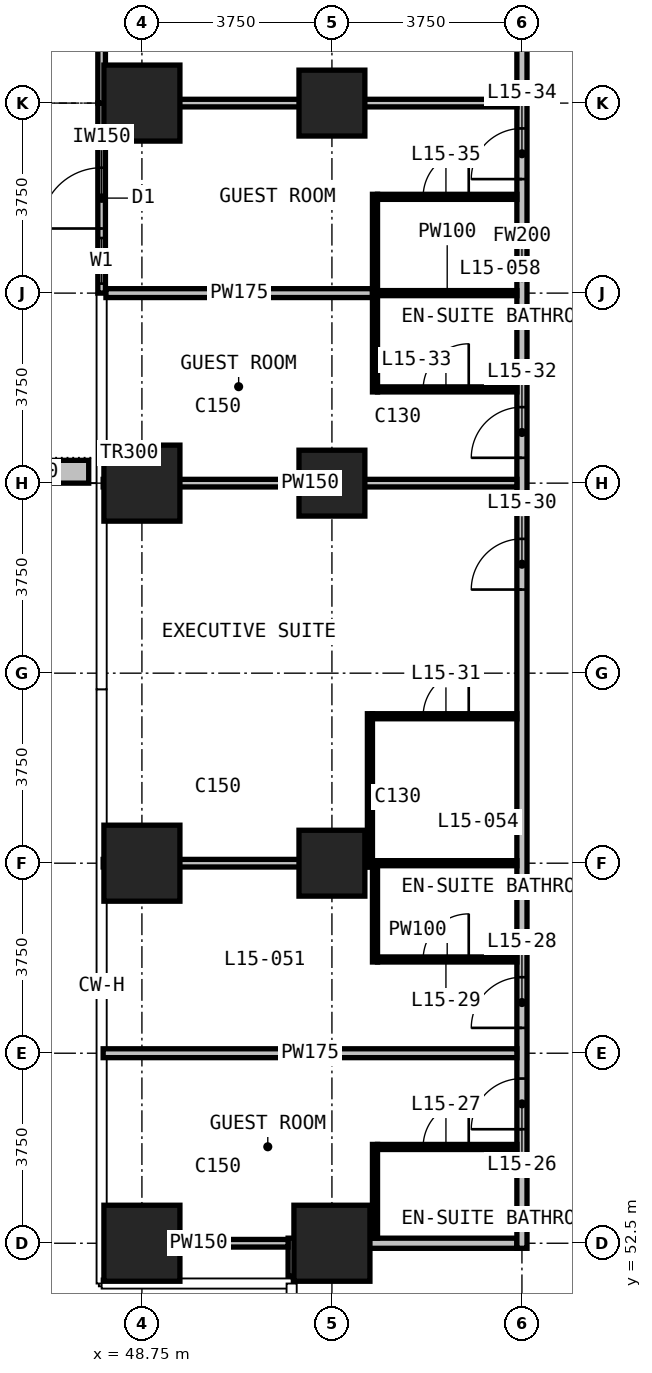
"""IFC4 building model, lengths in metres.
Left out: names, types, materials, properties, quantities, classifications, styles, units other than length and angle.
Written with IfcOpenShell. Run it as: python <this file> out.ifc"""

import sys

from ifc_helpers import new_model, si_unit, direction, frame, frame_2d, origin, origin_2d, place, context, subcontext, project, spatial, rectangle, extrude, element, fill, save


model = new_model("IFC4")
c1 = context("Model", 3, precision=1e-05, world=origin(), true_north=direction((0.0, 1.0)))
c2 = subcontext(c1, "Body", "Model", "MODEL_VIEW")
j1 = project(units=[si_unit("LENGTHUNIT", "METRE"), si_unit("PLANEANGLEUNIT", "RADIAN")], contexts=[c1])
p1 = place(None, origin())
s1 = spatial("IfcSite", under=j1, at=p1, CompositionType="ELEMENT")
p2 = place(p1, origin())
s2 = spatial("IfcBuilding", under=s1, at=p2, CompositionType="ELEMENT")
p3 = place(p2, frame((0.0, 0.0, 69.2)))
s3 = spatial("IfcBuildingStorey", under=s2, at=p3, CompositionType="ELEMENT", Elevation=69.2)
for number, where, z_axis, x_axis in (
    (1, (48.75, 52.5, 0.0), (0.0, 0.0, 1.0), (1.0, 0.0, 0.0)),
    (2, (48.75, 60.0, 0.0), (0.0, 0.0, 1.0), (1.0, 0.0, 0.0)),
    (3, (48.75, 67.5, 0.0), (0.0, 0.0, 1.0), (1.0, 0.0, 0.0)),
    (4, (48.75, 75.0, 0.0), (0.0, 0.0, 1.0), (1.0, 0.0, 0.0)),
    (5, (52.5, 52.5, 0.0), (0.0, 0.0, 1.0), (1.0, 0.0, 0.0)),
):
    element("IfcColumn", number, at=place(p3, frame(where, z_axis=z_axis, x_axis=x_axis)), inside=s3, PredefinedType="COLUMN", context=c2, shape_type="SweptSolid", body=[
        extrude(rectangle(XDim=1.5, YDim=1.5, at=origin_2d()), origin(), (0.0, 0.0, 1.0), 3.3),
    ])
for number, where, z_axis, x_axis in (
    (6, (52.5, 60.0, 0.0), (0.0, 0.0, 1.0), (1.0, 0.0, 0.0)),
    (7, (52.5, 67.5, 0.0), (0.0, 0.0, 1.0), (1.0, 0.0, 0.0)),
    (8, (52.5, 75.0, 0.0), (0.0, 0.0, 1.0), (1.0, 0.0, 0.0)),
):
    element("IfcColumn", number, at=place(p3, frame(where, z_axis=z_axis, x_axis=x_axis)), inside=s3, PredefinedType="COLUMN", context=c2, shape_type="SweptSolid", body=[
        extrude(rectangle(XDim=1.3, YDim=1.3, at=origin_2d()), origin(), (0.0, 0.0, 1.0), 3.3),
    ])
p4 = place(p3, frame((47.955, 71.25, 0.0), z_axis=(0.0, 0.0, 1.0), x_axis=(0.0, 1.0, 0.0)))
e9 = element("IfcWall", 9, at=p4, inside=s3, PredefinedType="SOLIDWALL", context=c2, shape_type="SweptSolid", body=[
    extrude(rectangle(XDim=3.75, YDim=0.15, at=frame_2d((1.875, 0.0))), origin(), (0.0, 0.0, 1.0), 3.0),
])
p5 = place(p4, frame((0.188, 0.0, 0.1)))
e10 = element("IfcOpeningElement", 10, at=p5, cuts=e9, PredefinedType="OPENING", context=c2, shape_type="SweptSolid", body=[
    extrude(rectangle(XDim=0.9, YDim=2.4, at=frame_2d((0.45, 1.2))), frame((0.0, 0.085, 0.0), z_axis=(0.0, -1.0, 0.0), x_axis=(1.0, 0.0, 0.0)), (0.0, 0.0, 1.0), 0.17),
])
p6 = place(p4, frame((1.275, 0.0, 0.0)))
e11 = element("IfcOpeningElement", 11, at=p6, cuts=e9, PredefinedType="OPENING", context=c2, shape_type="SweptSolid", body=[
    extrude(rectangle(XDim=1.2, YDim=2.4, at=frame_2d((0.6, 1.2))), frame((0.0, 0.085, 0.0), z_axis=(0.0, -1.0, 0.0), x_axis=(1.0, 0.0, 0.0)), (0.0, 0.0, 1.0), 0.17),
])
p7 = place(p3, frame((47.955, 75.0, 0.0), z_axis=(0.0, 0.0, 1.0), x_axis=(0.0, 1.0, 0.0)))
e12 = element("IfcWall", 12, at=p7, inside=s3, PredefinedType="SOLIDWALL", context=c2, shape_type="SweptSolid", body=[
    extrude(rectangle(XDim=3.75, YDim=0.15, at=frame_2d((1.875, 0.0))), origin(), (0.0, 0.0, 1.0), 3.0),
])
p8 = place(p7, frame((1.275, 0.0, 0.0)))
e13 = element("IfcOpeningElement", 13, at=p8, cuts=e12, PredefinedType="OPENING", context=c2, shape_type="SweptSolid", body=[
    extrude(rectangle(XDim=1.2, YDim=2.4, at=frame_2d((0.6, 1.2))), frame((0.0, 0.085, 0.0), z_axis=(0.0, -1.0, 0.0), x_axis=(1.0, 0.0, 0.0)), (0.0, 0.0, 1.0), 0.17),
])
p9 = place(p7, frame((2.663, 0.0, 0.1)))
e14 = element("IfcOpeningElement", 14, at=p9, cuts=e12, PredefinedType="OPENING", context=c2, shape_type="SweptSolid", body=[
    extrude(rectangle(XDim=0.9, YDim=2.4, at=frame_2d((0.45, 1.2))), frame((0.0, 0.085, 0.0), z_axis=(0.0, -1.0, 0.0), x_axis=(1.0, 0.0, 0.0)), (0.0, 0.0, 1.0), 0.17),
])
p10 = place(p3, frame((47.7, 67.725, 0.0), z_axis=(0.0, 0.0, 1.0), x_axis=(-1.0, 0.0, 0.0)))
e15 = element("IfcWall", 15, at=p10, inside=s3, PredefinedType="USERDEFINED", context=c2, shape_type="SweptSolid", body=[
    extrude(rectangle(XDim=2.35, YDim=0.45, at=frame_2d((1.175, 0.0))), origin(), (0.0, 0.0, 1.0), 1.1),
])
p11 = place(p3, frame((51.835, 52.5, 0.0), z_axis=(0.0, 0.0, 1.0), x_axis=(1.0, 0.0, 0.0)))
e16 = element("IfcWall", 16, at=p11, inside=s3, PredefinedType="PARTITIONING", context=c2, shape_type="SweptSolid", body=[
    extrude(rectangle(XDim=4.315, YDim=0.2, at=frame_2d((2.157, 0.0))), origin(), (0.0, 0.0, 1.0), 3.0),
])
p12 = place(p3, frame((51.735, 51.855, 0.0), z_axis=(0.0, 0.0, 1.0), x_axis=(0.0, 1.0, 0.0)))
e17 = element("IfcWall", 17, at=p12, inside=s3, PredefinedType="PARTITIONING", context=c2, shape_type="SweptSolid", body=[
    extrude(rectangle(XDim=0.745, YDim=0.2, at=frame_2d((0.373, 0.0))), origin(), (0.0, 0.0, 1.0), 3.0),
])
p13 = place(p3, frame((56.25, 52.4, 0.0), z_axis=(0.0, 0.0, 1.0), x_axis=(0.0, 1.0, 0.0)))
e18 = element("IfcWall", 18, at=p13, inside=s3, PredefinedType="PARTITIONING", context=c2, shape_type="SweptSolid", body=[
    extrude(rectangle(XDim=38.31, YDim=0.2, at=frame_2d((19.155, 0.0))), origin(), (0.0, 0.0, 1.0), 3.0),
])
p14 = place(p13, frame((2.35, 0.0, 0.0)))
e19 = element("IfcOpeningElement", 19, at=p14, cuts=e18, PredefinedType="OPENING", context=c2, shape_type="SweptSolid", body=[
    extrude(rectangle(XDim=1.0, YDim=2.2, at=frame_2d((0.5, 1.1))), frame((0.0, 0.11, 0.0), z_axis=(0.0, -1.0, 0.0), x_axis=(1.0, 0.0, 0.0)), (0.0, 0.0, 1.0), 0.22),
])
p15 = place(p13, frame((4.35, 0.0, 0.0)))
e20 = element("IfcOpeningElement", 20, at=p15, cuts=e18, PredefinedType="OPENING", context=c2, shape_type="SweptSolid", body=[
    extrude(rectangle(XDim=1.0, YDim=2.2, at=frame_2d((0.5, 1.1))), frame((0.0, 0.11, 0.0), z_axis=(0.0, -1.0, 0.0), x_axis=(1.0, 0.0, 0.0)), (0.0, 0.0, 1.0), 0.22),
])
p16 = place(p13, frame((13.0, 0.0, 0.0)))
e21 = element("IfcOpeningElement", 21, at=p16, cuts=e18, PredefinedType="OPENING", context=c2, shape_type="SweptSolid", body=[
    extrude(rectangle(XDim=1.0, YDim=2.2, at=frame_2d((0.5, 1.1))), frame((0.0, 0.11, 0.0), z_axis=(0.0, -1.0, 0.0), x_axis=(1.0, 0.0, 0.0)), (0.0, 0.0, 1.0), 0.22),
])
p17 = place(p13, frame((15.6, 0.0, 0.0)))
e22 = element("IfcOpeningElement", 22, at=p17, cuts=e18, PredefinedType="OPENING", context=c2, shape_type="SweptSolid", body=[
    extrude(rectangle(XDim=1.0, YDim=2.2, at=frame_2d((0.5, 1.1))), frame((0.0, 0.11, 0.0), z_axis=(0.0, -1.0, 0.0), x_axis=(1.0, 0.0, 0.0)), (0.0, 0.0, 1.0), 0.22),
])
p18 = place(p13, frame((21.1, 0.0, 0.0)))
e23 = element("IfcOpeningElement", 23, at=p18, cuts=e18, PredefinedType="OPENING", context=c2, shape_type="SweptSolid", body=[
    extrude(rectangle(XDim=1.0, YDim=2.2, at=frame_2d((0.5, 1.1))), frame((0.0, 0.11, 0.0), z_axis=(0.0, -1.0, 0.0), x_axis=(1.0, 0.0, 0.0)), (0.0, 0.0, 1.0), 0.22),
])
p19 = place(p13, frame((23.7, 0.0, 0.0)))
e24 = element("IfcOpeningElement", 24, at=p19, cuts=e18, PredefinedType="OPENING", context=c2, shape_type="SweptSolid", body=[
    extrude(rectangle(XDim=1.0, YDim=2.2, at=frame_2d((0.5, 1.1))), frame((0.0, 0.11, 0.0), z_axis=(0.0, -1.0, 0.0), x_axis=(1.0, 0.0, 0.0)), (0.0, 0.0, 1.0), 0.22),
])
p20 = place(p13, frame((31.55, 0.0, 0.0)))
e25 = element("IfcOpeningElement", 25, at=p20, cuts=e18, PredefinedType="OPENING", context=c2, shape_type="SweptSolid", body=[
    extrude(rectangle(XDim=0.9, YDim=2.2, at=frame_2d((0.45, 1.1))), frame((0.0, 0.11, 0.0), z_axis=(0.0, -1.0, 0.0), x_axis=(1.0, 0.0, 0.0)), (0.0, 0.0, 1.0), 0.22),
])
p21 = place(p13, frame((35.65, 0.0, 0.0)))
e26 = element("IfcOpeningElement", 26, at=p21, cuts=e18, PredefinedType="OPENING", context=c2, shape_type="SweptSolid", body=[
    extrude(rectangle(XDim=0.9, YDim=2.2, at=frame_2d((0.45, 1.1))), frame((0.0, 0.11, 0.0), z_axis=(0.0, -1.0, 0.0), x_axis=(1.0, 0.0, 0.0)), (0.0, 0.0, 1.0), 0.22),
])
p22 = place(p3, frame((47.985, 56.25, 0.0), z_axis=(0.0, 0.0, 1.0), x_axis=(1.0, 0.0, 0.0)))
e27 = element("IfcWall", 27, at=p22, inside=s3, PredefinedType="PARTITIONING", context=c2, shape_type="SweptSolid", body=[
    extrude(rectangle(XDim=8.165, YDim=0.175, at=frame_2d((4.083, 0.0))), origin(), (0.0, 0.0, 1.0), 3.0),
])
p23 = place(p3, frame((48.04, 71.25, 0.0), z_axis=(0.0, 0.0, 1.0), x_axis=(1.0, 0.0, 0.0)))
e28 = element("IfcWall", 28, at=p23, inside=s3, PredefinedType="PARTITIONING", context=c2, shape_type="SweptSolid", body=[
    extrude(rectangle(XDim=5.26, YDim=0.175, at=frame_2d((2.63, 0.0))), origin(), (0.0, 0.0, 1.0), 3.0),
])
p24 = place(p3, frame((48.105, 52.5, 0.0), z_axis=(0.0, 0.0, 1.0), x_axis=(1.0, 0.0, 0.0)))
e29 = element("IfcWall", 29, at=p24, inside=s3, PredefinedType="PARTITIONING", context=c2, shape_type="SweptSolid", body=[
    extrude(rectangle(XDim=3.53, YDim=0.15, at=frame_2d((1.765, 0.0))), origin(), (0.0, 0.0, 1.0), 3.0),
])
p25 = place(p3, frame((47.985, 60.0, 0.0), z_axis=(0.0, 0.0, 1.0), x_axis=(1.0, 0.0, 0.0)))
e30 = element("IfcWall", 30, at=p25, inside=s3, PredefinedType="PARTITIONING", context=c2, shape_type="SweptSolid", body=[
    extrude(rectangle(XDim=5.215, YDim=0.15, at=frame_2d((2.607, 0.0))), origin(), (0.0, 0.0, 1.0), 3.0),
])
p26 = place(p3, frame((47.985, 67.5, 0.0), z_axis=(0.0, 0.0, 1.0), x_axis=(1.0, 0.0, 0.0)))
e31 = element("IfcWall", 31, at=p26, inside=s3, PredefinedType="PARTITIONING", context=c2, shape_type="SweptSolid", body=[
    extrude(rectangle(XDim=8.165, YDim=0.15, at=frame_2d((4.083, 0.0))), origin(), (0.0, 0.0, 1.0), 3.0),
])
p27 = place(p3, frame((48.04, 75.0, 0.0), z_axis=(0.0, 0.0, 1.0), x_axis=(1.0, 0.0, 0.0)))
e32 = element("IfcWall", 32, at=p27, inside=s3, PredefinedType="PARTITIONING", context=c2, shape_type="SweptSolid", body=[
    extrude(rectangle(XDim=8.11, YDim=0.15, at=frame_2d((4.055, 0.0))), origin(), (0.0, 0.0, 1.0), 3.0),
])
p28 = place(p3, frame((53.4, 54.4, 0.0), z_axis=(0.0, 0.0, 1.0), x_axis=(1.0, 0.0, 0.0)))
e33 = element("IfcWall", 33, at=p28, inside=s3, PredefinedType="PARTITIONING", context=c2, shape_type="SweptSolid", body=[
    extrude(rectangle(XDim=2.75, YDim=0.1, at=frame_2d((1.375, 0.0))), origin(), (0.0, 0.0, 1.0), 3.0),
])
p29 = place(p28, frame((0.9, 0.0, 0.0)))
e34 = element("IfcOpeningElement", 34, at=p29, cuts=e33, PredefinedType="OPENING", context=c2, shape_type="SweptSolid", body=[
    extrude(rectangle(XDim=0.9, YDim=2.2, at=frame_2d((0.45, 1.1))), frame((0.0, 0.06, 0.0), z_axis=(0.0, -1.0, 0.0), x_axis=(1.0, 0.0, 0.0)), (0.0, 0.0, 1.0), 0.12),
])
p30 = place(p3, frame((53.4, 58.1, 0.0), z_axis=(0.0, 0.0, 1.0), x_axis=(1.0, 0.0, 0.0)))
e35 = element("IfcWall", 35, at=p30, inside=s3, PredefinedType="PARTITIONING", context=c2, shape_type="SweptSolid", body=[
    extrude(rectangle(XDim=2.75, YDim=0.1, at=frame_2d((1.375, 0.0))), origin(), (0.0, 0.0, 1.0), 3.0),
])
p31 = place(p30, frame((0.9, 0.0, 0.0)))
e36 = element("IfcOpeningElement", 36, at=p31, cuts=e35, PredefinedType="OPENING", context=c2, shape_type="SweptSolid", body=[
    extrude(rectangle(XDim=0.9, YDim=2.2, at=frame_2d((0.45, 1.1))), frame((0.0, 0.06, 0.0), z_axis=(0.0, -1.0, 0.0), x_axis=(1.0, 0.0, 0.0)), (0.0, 0.0, 1.0), 0.12),
])
p32 = place(p3, frame((53.4, 60.0, 0.0), z_axis=(0.0, 0.0, 1.0), x_axis=(1.0, 0.0, 0.0)))
e37 = element("IfcWall", 37, at=p32, inside=s3, PredefinedType="PARTITIONING", context=c2, shape_type="SweptSolid", body=[
    extrude(rectangle(XDim=2.75, YDim=0.1, at=frame_2d((1.375, 0.0))), origin(), (0.0, 0.0, 1.0), 3.0),
])
p33 = place(p3, frame((53.3, 62.9, 0.0), z_axis=(0.0, 0.0, 1.0), x_axis=(1.0, 0.0, 0.0)))
e38 = element("IfcWall", 38, at=p33, inside=s3, PredefinedType="PARTITIONING", context=c2, shape_type="SweptSolid", body=[
    extrude(rectangle(XDim=2.85, YDim=0.1, at=frame_2d((1.425, 0.0))), origin(), (0.0, 0.0, 1.0), 3.0),
])
p34 = place(p33, frame((1.0, 0.0, 0.0)))
e39 = element("IfcOpeningElement", 39, at=p34, cuts=e38, PredefinedType="OPENING", context=c2, shape_type="SweptSolid", body=[
    extrude(rectangle(XDim=0.9, YDim=2.2, at=frame_2d((0.45, 1.1))), frame((0.0, 0.06, 0.0), z_axis=(0.0, -1.0, 0.0), x_axis=(1.0, 0.0, 0.0)), (0.0, 0.0, 1.0), 0.12),
])
p35 = place(p3, frame((53.4, 69.35, 0.0), z_axis=(0.0, 0.0, 1.0), x_axis=(1.0, 0.0, 0.0)))
e40 = element("IfcWall", 40, at=p35, inside=s3, PredefinedType="PARTITIONING", context=c2, shape_type="SweptSolid", body=[
    extrude(rectangle(XDim=2.75, YDim=0.1, at=frame_2d((1.375, 0.0))), origin(), (0.0, 0.0, 1.0), 3.0),
])
p36 = place(p35, frame((0.9, 0.0, 0.0)))
e41 = element("IfcOpeningElement", 41, at=p36, cuts=e40, PredefinedType="OPENING", context=c2, shape_type="SweptSolid", body=[
    extrude(rectangle(XDim=0.9, YDim=2.2, at=frame_2d((0.45, 1.1))), frame((0.0, 0.06, 0.0), z_axis=(0.0, -1.0, 0.0), x_axis=(1.0, 0.0, 0.0)), (0.0, 0.0, 1.0), 0.12),
])
p37 = place(p3, frame((53.4, 71.25, 0.0), z_axis=(0.0, 0.0, 1.0), x_axis=(1.0, 0.0, 0.0)))
e42 = element("IfcWall", 42, at=p37, inside=s3, PredefinedType="PARTITIONING", context=c2, shape_type="SweptSolid", body=[
    extrude(rectangle(XDim=2.75, YDim=0.1, at=frame_2d((1.375, 0.0))), origin(), (0.0, 0.0, 1.0), 3.0),
])
p38 = place(p3, frame((53.4, 73.15, 0.0), z_axis=(0.0, 0.0, 1.0), x_axis=(1.0, 0.0, 0.0)))
e43 = element("IfcWall", 43, at=p38, inside=s3, PredefinedType="PARTITIONING", context=c2, shape_type="SweptSolid", body=[
    extrude(rectangle(XDim=2.75, YDim=0.1, at=frame_2d((1.375, 0.0))), origin(), (0.0, 0.0, 1.0), 3.0),
])
p39 = place(p38, frame((0.9, 0.0, 0.0)))
e44 = element("IfcOpeningElement", 44, at=p39, cuts=e43, PredefinedType="OPENING", context=c2, shape_type="SweptSolid", body=[
    extrude(rectangle(XDim=0.9, YDim=2.2, at=frame_2d((0.45, 1.1))), frame((0.0, 0.06, 0.0), z_axis=(0.0, -1.0, 0.0), x_axis=(1.0, 0.0, 0.0)), (0.0, 0.0, 1.0), 0.12),
])
p40 = place(p3, frame((53.25, 59.925, 0.0), z_axis=(0.0, 0.0, 1.0), x_axis=(0.0, 1.0, 0.0)))
e45 = element("IfcWall", 45, at=p40, inside=s3, PredefinedType="PARTITIONING", context=c2, shape_type="SweptSolid", body=[
    extrude(rectangle(XDim=3.025, YDim=0.1, at=frame_2d((1.512, 0.0))), origin(), (0.0, 0.0, 1.0), 3.0),
])
p41 = place(p3, frame((53.35, 52.6, 0.0), z_axis=(0.0, 0.0, 1.0), x_axis=(0.0, 1.0, 0.0)))
e46 = element("IfcWall", 46, at=p41, inside=s3, PredefinedType="PARTITIONING", context=c2, shape_type="SweptSolid", body=[
    extrude(rectangle(XDim=1.85, YDim=0.1, at=frame_2d((0.925, 0.0))), origin(), (0.0, 0.0, 1.0), 3.0),
])
p42 = place(p3, frame((53.35, 58.05, 0.0), z_axis=(0.0, 0.0, 1.0), x_axis=(0.0, 1.0, 0.0)))
e47 = element("IfcWall", 47, at=p42, inside=s3, PredefinedType="PARTITIONING", context=c2, shape_type="SweptSolid", body=[
    extrude(rectangle(XDim=2.0, YDim=0.1, at=frame_2d((1.0, 0.0))), origin(), (0.0, 0.0, 1.0), 3.0),
])
p43 = place(p3, frame((53.35, 69.3, 0.0), z_axis=(0.0, 0.0, 1.0), x_axis=(0.0, 1.0, 0.0)))
e48 = element("IfcWall", 48, at=p43, inside=s3, PredefinedType="PARTITIONING", context=c2, shape_type="SweptSolid", body=[
    extrude(rectangle(XDim=3.9, YDim=0.1, at=frame_2d((1.95, 0.0))), origin(), (0.0, 0.0, 1.0), 3.0),
])
p44 = place(p5, origin())
e49 = element("IfcWindow", 49, at=p44, inside=s3, PartitioningType="SINGLE_PANEL", PredefinedType="WINDOW", context=c2, shape_type="SweptSolid", body=[
    extrude(rectangle(XDim=0.9, YDim=2.4, at=frame_2d((0.45, 1.2))), frame((0.0, 0.03, 0.0), z_axis=(0.0, -1.0, 0.0), x_axis=(1.0, 0.0, 0.0)), (0.0, 0.0, 1.0), 0.06),
])
fill(e10, e49)
p45 = place(p6, origin())
e50 = element("IfcDoor", 50, at=p45, inside=s3, OperationType="SINGLE_SWING_LEFT", PredefinedType="DOOR", context=c2, shape_type="SweptSolid", body=[
    extrude(rectangle(XDim=1.2, YDim=2.4, at=frame_2d((0.6, 1.2))), frame((0.0, 0.025, 0.0), z_axis=(0.0, -1.0, 0.0), x_axis=(1.0, 0.0, 0.0)), (0.0, 0.0, 1.0), 0.05),
])
fill(e11, e50)
p46 = place(p14, origin())
e51 = element("IfcDoor", 51, at=p46, inside=s3, OperationType="SINGLE_SWING_RIGHT", PredefinedType="DOOR", context=c2, shape_type="SweptSolid", body=[
    extrude(rectangle(XDim=1.0, YDim=2.2, at=frame_2d((0.5, 1.1))), frame((0.0, 0.025, 0.0), z_axis=(0.0, -1.0, 0.0), x_axis=(1.0, 0.0, 0.0)), (0.0, 0.0, 1.0), 0.05),
])
fill(e19, e51)
p47 = place(p29, origin())
e52 = element("IfcDoor", 52, at=p47, inside=s3, OperationType="SINGLE_SWING_RIGHT", PredefinedType="DOOR", context=c2, shape_type="SweptSolid", body=[
    extrude(rectangle(XDim=0.9, YDim=2.2, at=frame_2d((0.45, 1.1))), frame((0.0, 0.025, 0.0), z_axis=(0.0, -1.0, 0.0), x_axis=(1.0, 0.0, 0.0)), (0.0, 0.0, 1.0), 0.05),
])
fill(e34, e52)
p48 = place(p15, origin())
e53 = element("IfcDoor", 53, at=p48, inside=s3, OperationType="SINGLE_SWING_LEFT", PredefinedType="DOOR", context=c2, shape_type="SweptSolid", body=[
    extrude(rectangle(XDim=1.0, YDim=2.2, at=frame_2d((0.5, 1.1))), frame((0.0, 0.025, 0.0), z_axis=(0.0, -1.0, 0.0), x_axis=(1.0, 0.0, 0.0)), (0.0, 0.0, 1.0), 0.05),
])
fill(e20, e53)
p49 = place(p31, origin())
e54 = element("IfcDoor", 54, at=p49, inside=s3, OperationType="SINGLE_SWING_RIGHT", PredefinedType="DOOR", context=c2, shape_type="SweptSolid", body=[
    extrude(rectangle(XDim=0.9, YDim=2.2, at=frame_2d((0.45, 1.1))), frame((0.0, 0.025, 0.0), z_axis=(0.0, -1.0, 0.0), x_axis=(1.0, 0.0, 0.0)), (0.0, 0.0, 1.0), 0.05),
])
fill(e36, e54)
p50 = place(p16, origin())
e55 = element("IfcDoor", 55, at=p50, inside=s3, OperationType="SINGLE_SWING_RIGHT", PredefinedType="DOOR", context=c2, shape_type="SweptSolid", body=[
    extrude(rectangle(XDim=1.0, YDim=2.2, at=frame_2d((0.5, 1.1))), frame((0.0, 0.025, 0.0), z_axis=(0.0, -1.0, 0.0), x_axis=(1.0, 0.0, 0.0)), (0.0, 0.0, 1.0), 0.05),
])
fill(e21, e55)
p51 = place(p34, origin())
e56 = element("IfcDoor", 56, at=p51, inside=s3, OperationType="SINGLE_SWING_RIGHT", PredefinedType="DOOR", context=c2, shape_type="SweptSolid", body=[
    extrude(rectangle(XDim=0.9, YDim=2.2, at=frame_2d((0.45, 1.1))), frame((0.0, 0.025, 0.0), z_axis=(0.0, -1.0, 0.0), x_axis=(1.0, 0.0, 0.0)), (0.0, 0.0, 1.0), 0.05),
])
fill(e39, e56)
p52 = place(p17, origin())
e57 = element("IfcDoor", 57, at=p52, inside=s3, OperationType="SINGLE_SWING_LEFT", PredefinedType="DOOR", context=c2, shape_type="SweptSolid", body=[
    extrude(rectangle(XDim=1.0, YDim=2.2, at=frame_2d((0.5, 1.1))), frame((0.0, 0.025, 0.0), z_axis=(0.0, -1.0, 0.0), x_axis=(1.0, 0.0, 0.0)), (0.0, 0.0, 1.0), 0.05),
])
fill(e22, e57)
p53 = place(p36, origin())
e58 = element("IfcDoor", 58, at=p53, inside=s3, OperationType="SINGLE_SWING_RIGHT", PredefinedType="DOOR", context=c2, shape_type="SweptSolid", body=[
    extrude(rectangle(XDim=0.9, YDim=2.2, at=frame_2d((0.45, 1.1))), frame((0.0, 0.025, 0.0), z_axis=(0.0, -1.0, 0.0), x_axis=(1.0, 0.0, 0.0)), (0.0, 0.0, 1.0), 0.05),
])
fill(e41, e58)
p54 = place(p18, origin())
e59 = element("IfcDoor", 59, at=p54, inside=s3, OperationType="SINGLE_SWING_RIGHT", PredefinedType="DOOR", context=c2, shape_type="SweptSolid", body=[
    extrude(rectangle(XDim=1.0, YDim=2.2, at=frame_2d((0.5, 1.1))), frame((0.0, 0.025, 0.0), z_axis=(0.0, -1.0, 0.0), x_axis=(1.0, 0.0, 0.0)), (0.0, 0.0, 1.0), 0.05),
])
fill(e23, e59)
p55 = place(p39, origin())
e60 = element("IfcDoor", 60, at=p55, inside=s3, OperationType="SINGLE_SWING_RIGHT", PredefinedType="DOOR", context=c2, shape_type="SweptSolid", body=[
    extrude(rectangle(XDim=0.9, YDim=2.2, at=frame_2d((0.45, 1.1))), frame((0.0, 0.025, 0.0), z_axis=(0.0, -1.0, 0.0), x_axis=(1.0, 0.0, 0.0)), (0.0, 0.0, 1.0), 0.05),
])
fill(e44, e60)
save(model, sys.argv[1])
